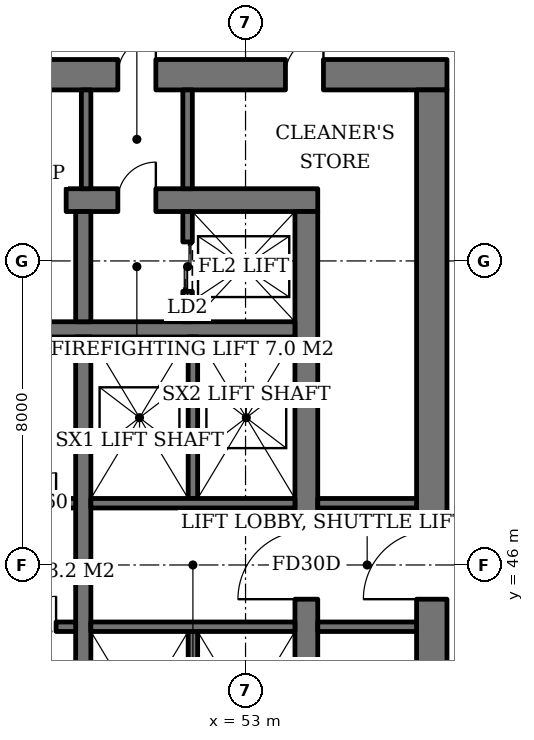
"""IFC4 building model, lengths in metres.
Left out: names, types, materials, properties, quantities, classifications, styles, units other than length and angle.
Written with IfcOpenShell. Run it as: python <this file> out.ifc"""

import sys

from ifc_helpers import new_model, si_unit, direction, frame, frame_2d, origin, place, context, subcontext, project, spatial, rectangle, extrude, element, fill, save


model = new_model("IFC4")
c1 = context("Model", 3, precision=1e-05, world=origin(), true_north=direction((0.0, 1.0)))
c2 = subcontext(c1, "Body", "Model", "MODEL_VIEW")
j1 = project(units=[si_unit("LENGTHUNIT", "METRE"), si_unit("PLANEANGLEUNIT", "RADIAN")], contexts=[c1])
p1 = place(None, origin())
s1 = spatial("IfcSite", under=j1, at=p1, CompositionType="ELEMENT")
p2 = place(p1, origin())
s2 = spatial("IfcBuilding", under=s1, at=p2, CompositionType="ELEMENT")
p3 = place(p2, frame((0.0, 0.0, 11.0)))
s3 = spatial("IfcBuildingStorey", under=s2, at=p3, CompositionType="ELEMENT", Elevation=11.0)
p4 = place(p3, frame((35.1, 55.6, 0.0), z_axis=(0.0, 0.0, 1.0), x_axis=(1.0, 0.0, 0.0)))
e1 = element("IfcWall", 1, at=p4, inside=s3, PredefinedType="SHEAR", context=c2, shape_type="SweptSolid", body=[
    extrude(rectangle(XDim=19.8, YDim=0.6, at=frame_2d((9.9, 0.0))), origin(), (0.0, 0.0, 1.0), 5.0),
])
p5 = place(p4, frame((14.54, 0.0, 0.0)))
e2 = element("IfcOpeningElement", 2, at=p5, cuts=e1, PredefinedType="OPENING", context=c2, shape_type="SweptSolid", body=[
    extrude(rectangle(XDim=1.0, YDim=2.1, at=frame_2d((0.5, 1.05))), frame((0.0, 0.31, 0.0), z_axis=(0.0, -1.0, 0.0), x_axis=(1.0, 0.0, 0.0)), (0.0, 0.0, 1.0), 0.62),
])
p6 = place(p4, frame((12.18, 0.0, 0.0)))
e3 = element("IfcOpeningElement", 3, at=p6, cuts=e1, PredefinedType="OPENING", context=c2, shape_type="SweptSolid", body=[
    extrude(rectangle(XDim=1.0, YDim=2.1, at=frame_2d((0.5, 1.05))), frame((0.0, 0.31, 0.0), z_axis=(0.0, -1.0, 0.0), x_axis=(1.0, 0.0, 0.0)), (0.0, 0.0, 1.0), 0.62),
])
p7 = place(p4, frame((2.425, 0.0, 0.0)))
e4 = element("IfcOpeningElement", 4, at=p7, cuts=e1, PredefinedType="OPENING", context=c2, shape_type="SweptSolid", body=[
    extrude(rectangle(XDim=1.0, YDim=2.1, at=frame_2d((0.5, 1.05))), frame((0.0, 0.31, 0.0), z_axis=(0.0, -1.0, 0.0), x_axis=(1.0, 0.0, 0.0)), (0.0, 0.0, 1.0), 0.62),
])
p8 = place(p3, frame((54.6, 36.7, 0.0), z_axis=(0.0, 0.0, 1.0), x_axis=(0.0, 1.0, 0.0)))
e5 = element("IfcWall", 5, at=p8, inside=s3, PredefinedType="SHEAR", context=c2, shape_type="SweptSolid", body=[
    extrude(rectangle(XDim=18.6, YDim=0.6, at=frame_2d((9.3, 0.0))), origin(), (0.0, 0.0, 1.0), 5.0),
])
p9 = place(p8, frame((8.4, 0.0, 0.0)))
e6 = element("IfcOpeningElement", 6, at=p9, cuts=e5, PredefinedType="OPENING", context=c2, shape_type="SweptSolid", body=[
    extrude(rectangle(XDim=1.8, YDim=2.4, at=frame_2d((0.9, 1.2))), frame((0.0, 0.31, 0.0), z_axis=(0.0, -1.0, 0.0), x_axis=(1.0, 0.0, 0.0)), (0.0, 0.0, 1.0), 0.62),
])
p10 = place(p3, frame((31.7, 58.9, 0.0), z_axis=(0.0, 0.0, 1.0), x_axis=(1.0, 0.0, 0.0)))
e7 = element("IfcWall", 7, at=p10, inside=s3, PredefinedType="SHEAR", context=c2, shape_type="SweptSolid", body=[
    extrude(rectangle(XDim=26.6, YDim=0.8, at=frame_2d((13.3, 0.0))), origin(), (0.0, 0.0, 1.0), 5.0),
])
p11 = place(p10, frame((17.94, 0.0, 0.0)))
e8 = element("IfcOpeningElement", 8, at=p11, cuts=e7, PredefinedType="OPENING", context=c2, shape_type="SweptSolid", body=[
    extrude(rectangle(XDim=1.0, YDim=2.1, at=frame_2d((0.5, 1.05))), frame((0.0, 0.41, 0.0), z_axis=(0.0, -1.0, 0.0), x_axis=(1.0, 0.0, 0.0)), (0.0, 0.0, 1.0), 0.82),
])
p12 = place(p10, frame((12.44, 0.0, 0.0)))
e9 = element("IfcOpeningElement", 9, at=p12, cuts=e7, PredefinedType="OPENING", context=c2, shape_type="SweptSolid", body=[
    extrude(rectangle(XDim=1.0, YDim=2.1, at=frame_2d((0.5, 1.05))), frame((0.0, 0.41, 0.0), z_axis=(0.0, -1.0, 0.0), x_axis=(1.0, 0.0, 0.0)), (0.0, 0.0, 1.0), 0.82),
])
p13 = place(p10, frame((5.825, 0.0, 0.0)))
e10 = element("IfcOpeningElement", 10, at=p13, cuts=e7, PredefinedType="OPENING", context=c2, shape_type="SweptSolid", body=[
    extrude(rectangle(XDim=1.0, YDim=2.1, at=frame_2d((0.5, 1.05))), frame((0.0, 0.41, 0.0), z_axis=(0.0, -1.0, 0.0), x_axis=(1.0, 0.0, 0.0)), (0.0, 0.0, 1.0), 0.82),
])
p14 = place(p10, frame((1.607, 0.0, 0.0)))
e11 = element("IfcOpeningElement", 11, at=p14, cuts=e7, PredefinedType="OPENING", context=c2, shape_type="SweptSolid", body=[
    extrude(rectangle(XDim=1.0, YDim=2.1, at=frame_2d((0.5, 1.05))), frame((0.0, 0.41, 0.0), z_axis=(0.0, -1.0, 0.0), x_axis=(1.0, 0.0, 0.0)), (0.0, 0.0, 1.0), 0.82),
])
p15 = place(p10, frame((3.666, 0.0, 0.0)))
e12 = element("IfcOpeningElement", 12, at=p15, cuts=e7, PredefinedType="OPENING", context=c2, shape_type="SweptSolid", body=[
    extrude(rectangle(XDim=1.0, YDim=2.1, at=frame_2d((0.5, 1.05))), frame((0.0, 0.41, 0.0), z_axis=(0.0, -1.0, 0.0), x_axis=(1.0, 0.0, 0.0)), (0.0, 0.0, 1.0), 0.82),
])
p16 = place(p10, frame((22.35, 0.0, 0.0)))
e13 = element("IfcOpeningElement", 13, at=p16, cuts=e7, PredefinedType="OPENING", context=c2, shape_type="SweptSolid", body=[
    extrude(rectangle(XDim=1.0, YDim=2.1, at=frame_2d((0.5, 1.05))), frame((0.0, 0.41, 0.0), z_axis=(0.0, -1.0, 0.0), x_axis=(1.0, 0.0, 0.0)), (0.0, 0.0, 1.0), 0.82),
])
p17 = place(p3, frame((57.9, 33.5, 0.0), z_axis=(0.0, 0.0, 1.0), x_axis=(0.0, 1.0, 0.0)))
e14 = element("IfcWall", 14, at=p17, inside=s3, PredefinedType="SHEAR", context=c2, shape_type="SweptSolid", body=[
    extrude(rectangle(XDim=25.0, YDim=0.8, at=frame_2d((12.5, 0.0))), origin(), (0.0, 0.0, 1.0), 5.0),
])
p18 = place(p17, frame((11.6, 0.0, 0.0)))
e15 = element("IfcOpeningElement", 15, at=p18, cuts=e14, PredefinedType="OPENING", context=c2, shape_type="SweptSolid", body=[
    extrude(rectangle(XDim=1.8, YDim=2.4, at=frame_2d((0.9, 1.2))), frame((0.0, 0.41, 0.0), z_axis=(0.0, -1.0, 0.0), x_axis=(1.0, 0.0, 0.0)), (0.0, 0.0, 1.0), 0.82),
])
p19 = place(p3, frame((35.7, 52.2, 0.0), z_axis=(0.0, 0.0, 1.0), x_axis=(1.0, 0.0, 0.0)))
e16 = element("IfcWall", 16, at=p19, inside=s3, PredefinedType="SHEAR", context=c2, shape_type="SweptSolid", body=[
    extrude(rectangle(XDim=18.6, YDim=0.4, at=frame_2d((9.3, 0.0))), origin(), (0.0, 0.0, 1.0), 5.0),
])
p20 = place(p3, frame((48.73, 40.0, 0.0), z_axis=(0.0, 0.0, 1.0), x_axis=(0.0, 1.0, 0.0)))
e17 = element("IfcWall", 17, at=p20, inside=s3, PredefinedType="SHEAR", context=c2, shape_type="SweptSolid", body=[
    extrude(rectangle(XDim=12.0, YDim=0.4, at=frame_2d((6.0, 0.0))), origin(), (0.0, 0.0, 1.0), 5.0),
])
p21 = place(p3, frame((48.73, 52.4, 0.0), z_axis=(0.0, 0.0, 1.0), x_axis=(0.0, 1.0, 0.0)))
e18 = element("IfcWall", 18, at=p21, inside=s3, PredefinedType="SHEAR", context=c2, shape_type="SweptSolid", body=[
    extrude(rectangle(XDim=2.9, YDim=0.4, at=frame_2d((1.45, 0.0))), origin(), (0.0, 0.0, 1.0), 5.0),
])
p22 = place(p3, frame((51.475, 52.4, 0.0), z_axis=(0.0, 0.0, 1.0), x_axis=(0.0, 1.0, 0.0)))
e19 = element("IfcWall", 19, at=p22, inside=s3, PredefinedType="SHEAR", context=c2, shape_type="SweptSolid", body=[
    extrude(rectangle(XDim=2.9, YDim=0.25, at=frame_2d((1.45, 0.0))), origin(), (0.0, 0.0, 1.0), 5.0),
])
p23 = place(p22, frame((0.8, 0.0, 0.0)))
e20 = element("IfcOpeningElement", 20, at=p23, cuts=e19, PredefinedType="OPENING", context=c2, shape_type="SweptSolid", body=[
    extrude(rectangle(XDim=1.3, YDim=2.2, at=frame_2d((0.65, 1.1))), frame((0.0, 0.135, 0.0), z_axis=(0.0, -1.0, 0.0), x_axis=(1.0, 0.0, 0.0)), (0.0, 0.0, 1.0), 0.27),
])
p24 = place(p3, frame((35.7, 47.625, 0.0), z_axis=(0.0, 0.0, 1.0), x_axis=(1.0, 0.0, 0.0)))
e21 = element("IfcWall", 21, at=p24, inside=s3, PredefinedType="SHEAR", context=c2, shape_type="SweptSolid", body=[
    extrude(rectangle(XDim=12.83, YDim=0.25, at=frame_2d((6.415, 0.0))), origin(), (0.0, 0.0, 1.0), 5.0),
])
p25 = place(p24, frame((11.515, 0.0, 0.0)))
e22 = element("IfcOpeningElement", 22, at=p25, cuts=e21, PredefinedType="OPENING", context=c2, shape_type="SweptSolid", body=[
    extrude(rectangle(XDim=0.8, YDim=2.0, at=frame_2d((0.4, 1.0))), frame((0.0, 0.135, 0.0), z_axis=(0.0, -1.0, 0.0), x_axis=(1.0, 0.0, 0.0)), (0.0, 0.0, 1.0), 0.27),
])
p26 = place(p3, frame((35.7, 44.375, 0.0), z_axis=(0.0, 0.0, 1.0), x_axis=(1.0, 0.0, 0.0)))
e23 = element("IfcWall", 23, at=p26, inside=s3, PredefinedType="SHEAR", context=c2, shape_type="SweptSolid", body=[
    extrude(rectangle(XDim=12.83, YDim=0.25, at=frame_2d((6.415, 0.0))), origin(), (0.0, 0.0, 1.0), 5.0),
])
p27 = place(p26, frame((11.515, 0.0, 0.0)))
e24 = element("IfcOpeningElement", 24, at=p27, cuts=e23, PredefinedType="OPENING", context=c2, shape_type="SweptSolid", body=[
    extrude(rectangle(XDim=0.8, YDim=2.0, at=frame_2d((0.4, 1.0))), frame((0.0, 0.135, 0.0), z_axis=(0.0, -1.0, 0.0), x_axis=(1.0, 0.0, 0.0)), (0.0, 0.0, 1.0), 0.27),
])
p28 = place(p3, frame((51.615, 47.75, 0.0), z_axis=(0.0, 0.0, 1.0), x_axis=(0.0, 1.0, 0.0)))
e25 = element("IfcWall", 25, at=p28, inside=s3, PredefinedType="SHEAR", context=c2, shape_type="SweptSolid", body=[
    extrude(rectangle(XDim=4.25, YDim=0.25, at=frame_2d((2.125, 0.0))), origin(), (0.0, 0.0, 1.0), 5.0),
])
p29 = place(p3, frame((48.93, 47.625, 0.0), z_axis=(0.0, 0.0, 1.0), x_axis=(1.0, 0.0, 0.0)))
e26 = element("IfcWall", 26, at=p29, inside=s3, PredefinedType="SHEAR", context=c2, shape_type="SweptSolid", body=[
    extrude(rectangle(XDim=5.37, YDim=0.25, at=frame_2d((2.685, 0.0))), origin(), (0.0, 0.0, 1.0), 5.0),
])
p30 = place(p3, frame((51.615, 44.25, 0.0), z_axis=(0.0, 0.0, 1.0), x_axis=(0.0, -1.0, 0.0)))
e27 = element("IfcWall", 27, at=p30, inside=s3, PredefinedType="SHEAR", context=c2, shape_type="SweptSolid", body=[
    extrude(rectangle(XDim=4.25, YDim=0.25, at=frame_2d((2.125, 0.0))), origin(), (0.0, 0.0, 1.0), 5.0),
])
p31 = place(p3, frame((48.93, 44.375, 0.0), z_axis=(0.0, 0.0, 1.0), x_axis=(1.0, 0.0, 0.0)))
e28 = element("IfcWall", 28, at=p31, inside=s3, PredefinedType="SHEAR", context=c2, shape_type="SweptSolid", body=[
    extrude(rectangle(XDim=5.37, YDim=0.25, at=frame_2d((2.685, 0.0))), origin(), (0.0, 0.0, 1.0), 5.0),
])
for number, where, z_axis, x_axis in (
    (29, (48.805, 55.9, 0.0), (0.0, 0.0, 1.0), (0.0, 1.0, 0.0)),
    (30, (51.475, 55.9, 0.0), (0.0, 0.0, 1.0), (0.0, 1.0, 0.0)),
    (31, (54.9, 44.375, 0.0), (0.0, 0.0, 1.0), (1.0, 0.0, 0.0)),
    (32, (54.9, 47.625, 0.0), (0.0, 0.0, 1.0), (1.0, 0.0, 0.0)),
):
    element("IfcWall", number, at=place(p3, frame(where, z_axis=z_axis, x_axis=x_axis)), inside=s3, PredefinedType="SOLIDWALL", context=c2, shape_type="SweptSolid", body=[
        extrude(rectangle(XDim=2.6, YDim=0.25, at=frame_2d((1.3, 0.0))), origin(), (0.0, 0.0, 1.0), 4.7),
    ])
p32 = place(p23, origin())
e33 = element("IfcDoor", 33, at=p32, inside=s3, OperationType="DOUBLE_DOOR_SLIDING", PredefinedType="DOOR", context=c2, shape_type="SweptSolid", body=[
    extrude(rectangle(XDim=1.3, YDim=2.2, at=frame_2d((0.65, 1.1))), frame((0.0, 0.025, 0.0), z_axis=(0.0, -1.0, 0.0), x_axis=(1.0, 0.0, 0.0)), (0.0, 0.0, 1.0), 0.05),
])
fill(e20, e33)
p33 = place(p25, origin())
e34 = element("IfcDoor", 34, at=p33, inside=s3, OperationType="SINGLE_SWING_RIGHT", PredefinedType="DOOR", context=c2, shape_type="SweptSolid", body=[
    extrude(rectangle(XDim=0.8, YDim=2.0, at=frame_2d((0.4, 1.0))), frame((0.0, 0.025, 0.0), z_axis=(0.0, -1.0, 0.0), x_axis=(1.0, 0.0, 0.0)), (0.0, 0.0, 1.0), 0.05),
])
fill(e22, e34)
p34 = place(p27, origin())
e35 = element("IfcDoor", 35, at=p34, inside=s3, OperationType="SINGLE_SWING_RIGHT", PredefinedType="DOOR", context=c2, shape_type="SweptSolid", body=[
    extrude(rectangle(XDim=0.8, YDim=2.0, at=frame_2d((0.4, 1.0))), frame((0.0, 0.025, 0.0), z_axis=(0.0, -1.0, 0.0), x_axis=(1.0, 0.0, 0.0)), (0.0, 0.0, 1.0), 0.05),
])
fill(e24, e35)
p35 = place(p5, origin())
e36 = element("IfcDoor", 36, at=p35, inside=s3, OperationType="SINGLE_SWING_RIGHT", PredefinedType="DOOR", context=c2, shape_type="SweptSolid", body=[
    extrude(rectangle(XDim=1.0, YDim=2.1, at=frame_2d((0.5, 1.05))), frame((0.0, 0.025, 0.0), z_axis=(0.0, -1.0, 0.0), x_axis=(1.0, 0.0, 0.0)), (0.0, 0.0, 1.0), 0.05),
])
fill(e2, e36)
p36 = place(p9, origin())
e37 = element("IfcDoor", 37, at=p36, inside=s3, OperationType="DOUBLE_DOOR_SINGLE_SWING", PredefinedType="DOOR", context=c2, shape_type="SweptSolid", body=[
    extrude(rectangle(XDim=1.8, YDim=2.4, at=frame_2d((0.9, 1.2))), frame((0.0, 0.025, 0.0), z_axis=(0.0, -1.0, 0.0), x_axis=(1.0, 0.0, 0.0)), (0.0, 0.0, 1.0), 0.05),
])
fill(e6, e37)
p37 = place(p6, origin())
e38 = element("IfcDoor", 38, at=p37, inside=s3, OperationType="SINGLE_SWING_RIGHT", PredefinedType="DOOR", context=c2, shape_type="SweptSolid", body=[
    extrude(rectangle(XDim=1.0, YDim=2.1, at=frame_2d((0.5, 1.05))), frame((0.0, 0.025, 0.0), z_axis=(0.0, -1.0, 0.0), x_axis=(1.0, 0.0, 0.0)), (0.0, 0.0, 1.0), 0.05),
])
fill(e3, e38)
p38 = place(p18, origin())
e39 = element("IfcDoor", 39, at=p38, inside=s3, OperationType="DOUBLE_DOOR_SINGLE_SWING", PredefinedType="DOOR", context=c2, shape_type="SweptSolid", body=[
    extrude(rectangle(XDim=1.8, YDim=2.4, at=frame_2d((0.9, 1.2))), frame((0.0, 0.025, 0.0), z_axis=(0.0, -1.0, 0.0), x_axis=(1.0, 0.0, 0.0)), (0.0, 0.0, 1.0), 0.05),
])
fill(e15, e39)
p39 = place(p11, origin())
e40 = element("IfcDoor", 40, at=p39, inside=s3, OperationType="SINGLE_SWING_RIGHT", PredefinedType="DOOR", context=c2, shape_type="SweptSolid", body=[
    extrude(rectangle(XDim=1.0, YDim=2.1, at=frame_2d((0.5, 1.05))), frame((0.0, 0.025, 0.0), z_axis=(0.0, -1.0, 0.0), x_axis=(1.0, 0.0, 0.0)), (0.0, 0.0, 1.0), 0.05),
])
fill(e8, e40)
p40 = place(p16, origin())
e41 = element("IfcDoor", 41, at=p40, inside=s3, OperationType="SINGLE_SWING_RIGHT", PredefinedType="DOOR", context=c2, shape_type="SweptSolid", body=[
    extrude(rectangle(XDim=1.0, YDim=2.1, at=frame_2d((0.5, 1.05))), frame((0.0, -0.34, 0.0), z_axis=(0.0, -1.0, 0.0), x_axis=(1.0, 0.0, 0.0)), (0.0, 0.0, 1.0), 0.05),
])
fill(e13, e41)
save(model, sys.argv[1])
